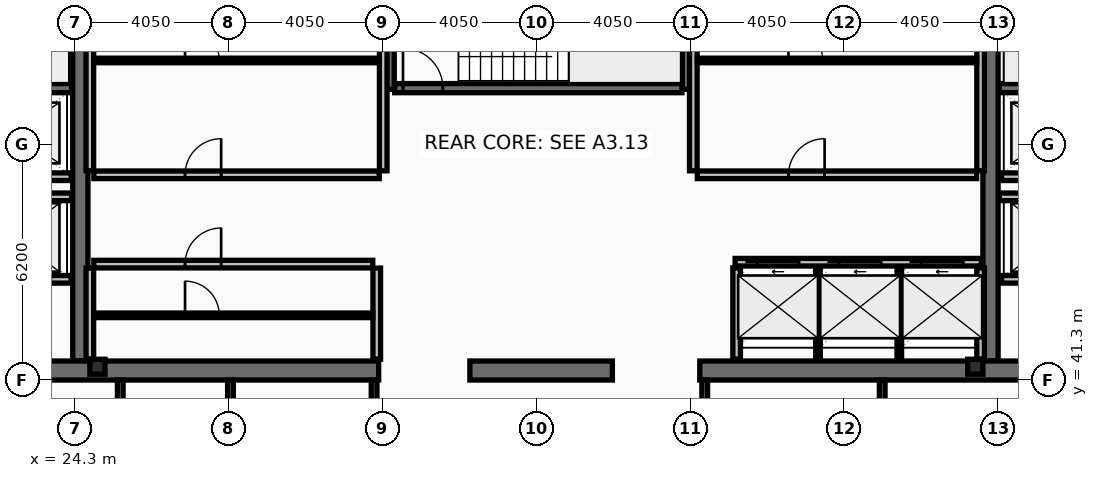
"""IFC4 building model, lengths in metres.
Left out: names, types, materials, properties, quantities, classifications, styles, units other than length and angle.
Written with IfcOpenShell. Run it as: python <this file> out.ifc"""

import sys

from ifc_helpers import new_model, si_unit, direction, frame, frame_2d, origin, origin_2d, place, context, subcontext, project, spatial, rectangle, i_section, extrude, element, fill, save


model = new_model("IFC4")
c1 = context("Model", 3, precision=1e-05, world=origin(), true_north=direction((0.0, 1.0)))
c2 = subcontext(c1, "Body", "Model", "MODEL_VIEW")
j1 = project(units=[si_unit("LENGTHUNIT", "METRE"), si_unit("PLANEANGLEUNIT", "RADIAN")], contexts=[c1])
p1 = place(None, origin())
s1 = spatial("IfcSite", under=j1, at=p1, CompositionType="ELEMENT")
p2 = place(p1, origin())
s2 = spatial("IfcBuilding", under=s1, at=p2, CompositionType="ELEMENT")
p3 = place(p2, frame((0.0, 0.0, 280.6)))
s3 = spatial("IfcBuildingStorey", under=s2, at=p3, CompositionType="ELEMENT", Elevation=280.6)
for number, where, z_axis, x_axis in (
    (1, (24.45, 41.8, 0.0), (0.0, 0.0, 1.0), (0.0, 1.0, 0.0)),
    (2, (48.4, 41.8, 0.0), (0.0, 0.0, 1.0), (0.0, 1.0, 0.0)),
):
    element("IfcWall", number, at=place(p3, frame(where, z_axis=z_axis, x_axis=x_axis)), inside=s3, PredefinedType="SHEAR", context=c2, shape_type="SweptSolid", body=[
        extrude(rectangle(XDim=11.4, YDim=0.4, at=frame_2d((5.7, 0.0))), origin(), (0.0, 0.0, 1.0), 3.44),
    ])
p4 = place(p3, frame((32.3, 41.55, 0.0), z_axis=(0.0, 0.0, 1.0), x_axis=(-1.0, 0.0, 0.0)))
e3 = element("IfcWall", 3, at=p4, inside=s3, PredefinedType="SHEAR", context=c2, shape_type="SweptSolid", body=[
    extrude(rectangle(XDim=11.45, YDim=0.5, at=frame_2d((5.725, 0.0))), origin(), (0.0, 0.0, 1.0), 3.44),
])
p5 = place(p3, frame((38.45, 41.55, 0.0), z_axis=(0.0, 0.0, 1.0), x_axis=(-1.0, 0.0, 0.0)))
e4 = element("IfcWall", 4, at=p5, inside=s3, PredefinedType="SHEAR", context=c2, shape_type="SweptSolid", body=[
    extrude(rectangle(XDim=3.75, YDim=0.5, at=frame_2d((1.875, 0.0))), origin(), (0.0, 0.0, 1.0), 3.44),
])
p6 = place(p3, frame((52.05, 41.55, 0.0), z_axis=(0.0, 0.0, 1.0), x_axis=(-1.0, 0.0, 0.0)))
e5 = element("IfcWall", 5, at=p6, inside=s3, PredefinedType="SHEAR", context=c2, shape_type="SweptSolid", body=[
    extrude(rectangle(XDim=11.3, YDim=0.5, at=frame_2d((5.65, 0.0))), origin(), (0.0, 0.0, 1.0), 3.44),
])
for number, where, z_axis, x_axis in (
    (6, (32.58, 48.95, 0.0), (0.0, 0.0, 1.0), (0.0, 1.0, 0.0)),
    (7, (40.42, 48.95, 0.0), (0.0, 0.0, 1.0), (0.0, 1.0, 0.0)),
):
    element("IfcWall", number, at=place(p3, frame(where, z_axis=z_axis, x_axis=x_axis)), inside=s3, PredefinedType="SHEAR", context=c2, shape_type="SweptSolid", body=[
        extrude(rectangle(XDim=4.25, YDim=0.26, at=frame_2d((2.125, 0.0))), origin(), (0.0, 0.0, 1.0), 3.44),
    ])
p7 = place(p3, frame((16.7, 48.98, 0.0), z_axis=(0.0, 0.0, 1.0), x_axis=(1.0, 0.0, 0.0)))
e8 = element("IfcWall", 8, at=p7, inside=s3, PredefinedType="SHEAR", context=c2, shape_type="SweptSolid", body=[
    extrude(rectangle(XDim=7.52, YDim=0.24, at=frame_2d((3.76, 0.0))), origin(), (0.0, 0.0, 1.0), 3.44),
])
p8 = place(p7, frame((0.22, 0.0, 0.0)))
e9 = element("IfcOpeningElement", 9, at=p8, cuts=e8, PredefinedType="OPENING", context=c2, shape_type="SweptSolid", body=[
    extrude(rectangle(XDim=1.05, YDim=2.15, at=frame_2d((0.525, 1.075))), frame((0.0, 0.13, 0.0), z_axis=(0.0, -1.0, 0.0), x_axis=(1.0, 0.0, 0.0)), (0.0, 0.0, 1.0), 0.26),
])
p9 = place(p3, frame((48.63, 48.98, 0.0), z_axis=(0.0, 0.0, 1.0), x_axis=(1.0, 0.0, 0.0)))
e10 = element("IfcWall", 10, at=p9, inside=s3, PredefinedType="SHEAR", context=c2, shape_type="SweptSolid", body=[
    extrude(rectangle(XDim=7.57, YDim=0.24, at=frame_2d((3.785, 0.0))), origin(), (0.0, 0.0, 1.0), 3.44),
])
p10 = place(p9, frame((6.3, 0.0, 0.0)))
e11 = element("IfcOpeningElement", 11, at=p10, cuts=e10, PredefinedType="OPENING", context=c2, shape_type="SweptSolid", body=[
    extrude(rectangle(XDim=1.05, YDim=2.15, at=frame_2d((0.525, 1.075))), frame((0.0, 0.13, 0.0), z_axis=(0.0, -1.0, 0.0), x_axis=(1.0, 0.0, 0.0)), (0.0, 0.0, 1.0), 0.26),
])
p11 = place(p3, frame((32.72, 48.98, 0.0), z_axis=(0.0, 0.0, 1.0), x_axis=(1.0, 0.0, 0.0)))
e12 = element("IfcWall", 12, at=p11, inside=s3, PredefinedType="SHEAR", context=c2, shape_type="SweptSolid", body=[
    extrude(rectangle(XDim=7.56, YDim=0.24, at=frame_2d((3.78, 0.0))), origin(), (0.0, 0.0, 1.0), 3.44),
])
p12 = place(p11, frame((0.22, 0.0, 0.0)))
e13 = element("IfcOpeningElement", 13, at=p12, cuts=e12, PredefinedType="OPENING", context=c2, shape_type="SweptSolid", body=[
    extrude(rectangle(XDim=1.05, YDim=2.15, at=frame_2d((0.525, 1.075))), frame((0.0, 0.13, 0.0), z_axis=(0.0, -1.0, 0.0), x_axis=(1.0, 0.0, 0.0)), (0.0, 0.0, 1.0), 0.26),
])
for number, where, z_axis, x_axis in (
    (14, (24.9, 41.65, 0.0), (0.0, 0.0, 1.0), (1.0, 0.0, 0.0)),
    (15, (48.0, 41.65, 0.0), (0.0, 0.0, 1.0), (1.0, 0.0, 0.0)),
):
    element("IfcColumn", number, at=place(p3, frame(where, z_axis=z_axis, x_axis=x_axis)), inside=s3, PredefinedType="COLUMN", context=c2, shape_type="SweptSolid", body=[
        extrude(i_section(OverallWidth=0.399, OverallDepth=0.393, WebThickness=0.023, FlangeThickness=0.037, at=origin_2d()), origin(), (0.0, 0.0, 1.0), 3.6),
    ])
p13 = place(p3, frame((41.68, 44.4, 0.0), z_axis=(0.0, 0.0, 1.0), x_axis=(1.0, 0.0, 0.0)))
e16 = element("IfcWall", 16, at=p13, inside=s3, PredefinedType="PARTITIONING", context=c2, shape_type="SweptSolid", body=[
    extrude(rectangle(XDim=6.48, YDim=0.2, at=frame_2d((3.24, 0.0))), origin(), (0.0, 0.0, 1.0), 3.44),
])
p14 = place(p13, frame((0.58, 0.0, 0.0)))
e17 = element("IfcOpeningElement", 17, at=p14, cuts=e16, PredefinedType="OPENING", context=c2, shape_type="SweptSolid", body=[
    extrude(rectangle(XDim=1.1, YDim=2.18, at=frame_2d((0.55, 1.09))), frame((0.0, 0.11, 0.0), z_axis=(0.0, -1.0, 0.0), x_axis=(1.0, 0.0, 0.0)), (0.0, 0.0, 1.0), 0.22),
])
p15 = place(p13, frame((2.74, 0.0, 0.0)))
e18 = element("IfcOpeningElement", 18, at=p15, cuts=e16, PredefinedType="OPENING", context=c2, shape_type="SweptSolid", body=[
    extrude(rectangle(XDim=1.1, YDim=2.18, at=frame_2d((0.55, 1.09))), frame((0.0, 0.11, 0.0), z_axis=(0.0, -1.0, 0.0), x_axis=(1.0, 0.0, 0.0)), (0.0, 0.0, 1.0), 0.22),
])
p16 = place(p13, frame((4.9, 0.0, 0.0)))
e19 = element("IfcOpeningElement", 19, at=p16, cuts=e16, PredefinedType="OPENING", context=c2, shape_type="SweptSolid", body=[
    extrude(rectangle(XDim=1.1, YDim=2.18, at=frame_2d((0.55, 1.09))), frame((0.0, 0.11, 0.0), z_axis=(0.0, -1.0, 0.0), x_axis=(1.0, 0.0, 0.0)), (0.0, 0.0, 1.0), 0.22),
])
p17 = place(p3, frame((51.61, 43.95, 0.0), z_axis=(0.0, 0.0, 1.0), x_axis=(-1.0, 0.0, 0.0)))
e20 = element("IfcWall", 20, at=p17, inside=s3, PredefinedType="PARTITIONING", context=c2, shape_type="SweptSolid", body=[
    extrude(rectangle(XDim=2.92, YDim=0.2, at=frame_2d((1.46, 0.0))), origin(), (0.0, 0.0, 1.0), 3.44),
])
p18 = place(p17, frame((0.81, 0.0, 0.0)))
e21 = element("IfcOpeningElement", 21, at=p18, cuts=e20, PredefinedType="OPENING", context=c2, shape_type="SweptSolid", body=[
    extrude(rectangle(XDim=1.3, YDim=2.18, at=frame_2d((0.65, 1.09))), frame((0.0, 0.11, 0.0), z_axis=(0.0, -1.0, 0.0), x_axis=(1.0, 0.0, 0.0)), (0.0, 0.0, 1.0), 0.22),
])
p19 = place(p3, frame((24.21, 43.95, 0.0), z_axis=(0.0, 0.0, 1.0), x_axis=(-1.0, 0.0, 0.0)))
e22 = element("IfcWall", 22, at=p19, inside=s3, PredefinedType="PARTITIONING", context=c2, shape_type="SweptSolid", body=[
    extrude(rectangle(XDim=2.97, YDim=0.2, at=frame_2d((1.485, 0.0))), origin(), (0.0, 0.0, 1.0), 3.44),
])
p20 = place(p19, frame((0.86, 0.0, 0.0)))
e23 = element("IfcOpeningElement", 23, at=p20, cuts=e22, PredefinedType="OPENING", context=c2, shape_type="SweptSolid", body=[
    extrude(rectangle(XDim=1.3, YDim=2.18, at=frame_2d((0.65, 1.09))), frame((0.0, 0.11, 0.0), z_axis=(0.0, -1.0, 0.0), x_axis=(1.0, 0.0, 0.0)), (0.0, 0.0, 1.0), 0.22),
])
p21 = place(p3, frame((51.61, 46.65, 0.0), z_axis=(0.0, 0.0, 1.0), x_axis=(-1.0, 0.0, 0.0)))
e24 = element("IfcWall", 24, at=p21, inside=s3, PredefinedType="PARTITIONING", context=c2, shape_type="SweptSolid", body=[
    extrude(rectangle(XDim=2.92, YDim=0.2, at=frame_2d((1.46, 0.0))), origin(), (0.0, 0.0, 1.0), 3.44),
])
p22 = place(p21, frame((0.86, 0.0, 0.0)))
e25 = element("IfcOpeningElement", 25, at=p22, cuts=e24, PredefinedType="OPENING", context=c2, shape_type="SweptSolid", body=[
    extrude(rectangle(XDim=1.2, YDim=2.18, at=frame_2d((0.6, 1.09))), frame((0.0, 0.11, 0.0), z_axis=(0.0, -1.0, 0.0), x_axis=(1.0, 0.0, 0.0)), (0.0, 0.0, 1.0), 0.22),
])
p23 = place(p3, frame((24.21, 46.65, 0.0), z_axis=(0.0, 0.0, 1.0), x_axis=(-1.0, 0.0, 0.0)))
e26 = element("IfcWall", 26, at=p23, inside=s3, PredefinedType="PARTITIONING", context=c2, shape_type="SweptSolid", body=[
    extrude(rectangle(XDim=2.97, YDim=0.2, at=frame_2d((1.485, 0.0))), origin(), (0.0, 0.0, 1.0), 3.44),
])
p24 = place(p23, frame((0.91, 0.0, 0.0)))
e27 = element("IfcOpeningElement", 27, at=p24, cuts=e26, PredefinedType="OPENING", context=c2, shape_type="SweptSolid", body=[
    extrude(rectangle(XDim=1.2, YDim=2.18, at=frame_2d((0.6, 1.09))), frame((0.0, 0.11, 0.0), z_axis=(0.0, -1.0, 0.0), x_axis=(1.0, 0.0, 0.0)), (0.0, 0.0, 1.0), 0.22),
])
p25 = place(p3, frame((21.2, 46.12, 0.0), z_axis=(0.0, 0.0, 1.0), x_axis=(1.0, 0.0, 0.0)))
e28 = element("IfcWall", 28, at=p25, inside=s3, PredefinedType="PARTITIONING", context=c2, shape_type="SweptSolid", body=[
    extrude(rectangle(XDim=3.02, YDim=0.2, at=frame_2d((1.51, 0.0))), origin(), (0.0, 0.0, 1.0), 3.44),
])
p26 = place(p3, frame((48.63, 46.12, 0.0), z_axis=(0.0, 0.0, 1.0), x_axis=(1.0, 0.0, 0.0)))
e29 = element("IfcWall", 29, at=p26, inside=s3, PredefinedType="PARTITIONING", context=c2, shape_type="SweptSolid", body=[
    extrude(rectangle(XDim=3.07, YDim=0.2, at=frame_2d((1.535, 0.0))), origin(), (0.0, 0.0, 1.0), 3.44),
])
for number, where, z_axis, x_axis in (
    (30, (24.7, 46.805, 0.0), (0.0, 0.0, 1.0), (0.0, 1.0, 0.0)),
    (31, (32.42, 46.805, 0.0), (0.0, 0.0, 1.0), (0.0, 1.0, 0.0)),
):
    element("IfcWall", number, at=place(p3, frame(where, z_axis=z_axis, x_axis=x_axis)), inside=s3, PredefinedType="PARTITIONING", context=c2, shape_type="SweptSolid", body=[
        extrude(rectangle(XDim=5.99, YDim=0.2, at=frame_2d((2.995, 0.0))), origin(), (0.0, 0.0, 1.0), 3.44),
    ])
p27 = place(p3, frame((24.805, 49.709, 0.0), z_axis=(0.0, 0.0, 1.0), x_axis=(1.0, 0.0, 0.0)))
e32 = element("IfcWall", 32, at=p27, inside=s3, PredefinedType="PARTITIONING", context=c2, shape_type="SweptSolid", body=[
    extrude(rectangle(XDim=7.51, YDim=0.12, at=frame_2d((3.755, 0.0))), origin(), (0.0, 0.0, 1.0), 3.44),
])
p28 = place(p27, frame((2.4, 0.0, 0.0)))
e33 = element("IfcOpeningElement", 33, at=p28, cuts=e32, PredefinedType="OPENING", context=c2, shape_type="SweptSolid", body=[
    extrude(rectangle(XDim=0.9, YDim=2.05, at=frame_2d((0.45, 1.025))), frame((0.0, 0.07, 0.0), z_axis=(0.0, -1.0, 0.0), x_axis=(1.0, 0.0, 0.0)), (0.0, 0.0, 1.0), 0.14),
])
p29 = place(p3, frame((24.805, 46.7, 0.0), z_axis=(0.0, 0.0, 1.0), x_axis=(1.0, 0.0, 0.0)))
e34 = element("IfcWall", 34, at=p29, inside=s3, PredefinedType="PARTITIONING", context=c2, shape_type="SweptSolid", body=[
    extrude(rectangle(XDim=7.51, YDim=0.2, at=frame_2d((3.755, 0.0))), origin(), (0.0, 0.0, 1.0), 3.44),
])
p30 = place(p29, frame((2.4, 0.0, 0.0)))
e35 = element("IfcOpeningElement", 35, at=p30, cuts=e34, PredefinedType="OPENING", context=c2, shape_type="SweptSolid", body=[
    extrude(rectangle(XDim=0.95, YDim=2.1, at=frame_2d((0.475, 1.05))), frame((0.0, 0.11, 0.0), z_axis=(0.0, -1.0, 0.0), x_axis=(1.0, 0.0, 0.0)), (0.0, 0.0, 1.0), 0.22),
])
for number, where, z_axis, x_axis in (
    (36, (24.7, 41.85, 0.0), (0.0, 0.0, 1.0), (0.0, 1.0, 0.0)),
    (37, (32.25, 41.85, 0.0), (0.0, 0.0, 1.0), (0.0, 1.0, 0.0)),
):
    element("IfcWall", number, at=place(p3, frame(where, z_axis=z_axis, x_axis=x_axis)), inside=s3, PredefinedType="PARTITIONING", context=c2, shape_type="SweptSolid", body=[
        extrude(rectangle(XDim=2.395, YDim=0.2, at=frame_2d((1.198, 0.0))), origin(), (0.0, 0.0, 1.0), 3.44),
    ])
p31 = place(p3, frame((24.805, 43.002, 0.0), z_axis=(0.0, 0.0, 1.0), x_axis=(1.0, 0.0, 0.0)))
e38 = element("IfcWall", 38, at=p31, inside=s3, PredefinedType="PARTITIONING", context=c2, shape_type="SweptSolid", body=[
    extrude(rectangle(XDim=7.34, YDim=0.12, at=frame_2d((3.67, 0.0))), origin(), (0.0, 0.0, 1.0), 3.44),
])
p32 = place(p31, frame((2.4, 0.0, 0.0)))
e39 = element("IfcOpeningElement", 39, at=p32, cuts=e38, PredefinedType="OPENING", context=c2, shape_type="SweptSolid", body=[
    extrude(rectangle(XDim=0.9, YDim=2.05, at=frame_2d((0.45, 1.025))), frame((0.0, 0.07, 0.0), z_axis=(0.0, -1.0, 0.0), x_axis=(1.0, 0.0, 0.0)), (0.0, 0.0, 1.0), 0.14),
])
p33 = place(p3, frame((24.805, 44.35, 0.0), z_axis=(0.0, 0.0, 1.0), x_axis=(1.0, 0.0, 0.0)))
e40 = element("IfcWall", 40, at=p33, inside=s3, PredefinedType="PARTITIONING", context=c2, shape_type="SweptSolid", body=[
    extrude(rectangle(XDim=7.34, YDim=0.2, at=frame_2d((3.67, 0.0))), origin(), (0.0, 0.0, 1.0), 3.44),
])
p34 = place(p33, frame((2.4, 0.0, 0.0)))
e41 = element("IfcOpeningElement", 41, at=p34, cuts=e40, PredefinedType="OPENING", context=c2, shape_type="SweptSolid", body=[
    extrude(rectangle(XDim=0.95, YDim=2.1, at=frame_2d((0.475, 1.05))), frame((0.0, 0.11, 0.0), z_axis=(0.0, -1.0, 0.0), x_axis=(1.0, 0.0, 0.0)), (0.0, 0.0, 1.0), 0.22),
])
for number, where, z_axis, x_axis in (
    (42, (40.58, 46.805, 0.0), (0.0, 0.0, 1.0), (0.0, 1.0, 0.0)),
    (43, (48.14, 46.805, 0.0), (0.0, 0.0, 1.0), (0.0, 1.0, 0.0)),
):
    element("IfcWall", number, at=place(p3, frame(where, z_axis=z_axis, x_axis=x_axis)), inside=s3, PredefinedType="PARTITIONING", context=c2, shape_type="SweptSolid", body=[
        extrude(rectangle(XDim=5.99, YDim=0.2, at=frame_2d((2.995, 0.0))), origin(), (0.0, 0.0, 1.0), 3.44),
    ])
p35 = place(p3, frame((40.685, 49.709, 0.0), z_axis=(0.0, 0.0, 1.0), x_axis=(1.0, 0.0, 0.0)))
e44 = element("IfcWall", 44, at=p35, inside=s3, PredefinedType="PARTITIONING", context=c2, shape_type="SweptSolid", body=[
    extrude(rectangle(XDim=7.35, YDim=0.12, at=frame_2d((3.675, 0.0))), origin(), (0.0, 0.0, 1.0), 3.44),
])
p36 = place(p35, frame((2.4, 0.0, 0.0)))
e45 = element("IfcOpeningElement", 45, at=p36, cuts=e44, PredefinedType="OPENING", context=c2, shape_type="SweptSolid", body=[
    extrude(rectangle(XDim=0.9, YDim=2.05, at=frame_2d((0.45, 1.025))), frame((0.0, 0.07, 0.0), z_axis=(0.0, -1.0, 0.0), x_axis=(1.0, 0.0, 0.0)), (0.0, 0.0, 1.0), 0.14),
])
p37 = place(p3, frame((40.685, 46.7, 0.0), z_axis=(0.0, 0.0, 1.0), x_axis=(1.0, 0.0, 0.0)))
e46 = element("IfcWall", 46, at=p37, inside=s3, PredefinedType="PARTITIONING", context=c2, shape_type="SweptSolid", body=[
    extrude(rectangle(XDim=7.35, YDim=0.2, at=frame_2d((3.675, 0.0))), origin(), (0.0, 0.0, 1.0), 3.44),
])
p38 = place(p37, frame((2.4, 0.0, 0.0)))
e47 = element("IfcOpeningElement", 47, at=p38, cuts=e46, PredefinedType="OPENING", context=c2, shape_type="SweptSolid", body=[
    extrude(rectangle(XDim=0.95, YDim=2.1, at=frame_2d((0.475, 1.05))), frame((0.0, 0.11, 0.0), z_axis=(0.0, -1.0, 0.0), x_axis=(1.0, 0.0, 0.0)), (0.0, 0.0, 1.0), 0.22),
])
for number, where, z_axis, x_axis in (
    (48, (41.72, 41.85, 0.0), (0.0, 0.0, 1.0), (0.0, 1.0, 0.0)),
    (49, (48.14, 41.85, 0.0), (0.0, 0.0, 1.0), (0.0, 1.0, 0.0)),
):
    element("IfcWall", number, at=place(p3, frame(where, z_axis=z_axis, x_axis=x_axis)), inside=s3, PredefinedType="PARTITIONING", context=c2, shape_type="SweptSolid", body=[
        extrude(rectangle(XDim=2.4, YDim=0.2, at=frame_2d((1.2, 0.0))), origin(), (0.0, 0.0, 1.0), 3.44),
    ])
for number, where, z_axis, x_axis in (
    (50, (43.86, 41.85, 0.0), (0.0, 0.0, 1.0), (0.0, 1.0, 0.0)),
    (51, (46.0, 41.85, 0.0), (0.0, 0.0, 1.0), (0.0, 1.0, 0.0)),
):
    element("IfcWall", number, at=place(p3, frame(where, z_axis=z_axis, x_axis=x_axis)), inside=s3, PredefinedType="PARTITIONING", context=c2, shape_type="SweptSolid", body=[
        extrude(rectangle(XDim=2.4, YDim=0.12, at=frame_2d((1.2, 0.0))), origin(), (0.0, 0.0, 1.0), 3.44),
    ])
for number, where, z_axis, x_axis in (
    (52, (25.5, 38.28, 0.0), (0.0, 0.0, 1.0), (0.0, 1.0, 0.0)),
    (53, (28.4, 38.28, 0.0), (0.0, 0.0, 1.0), (0.0, 1.0, 0.0)),
    (54, (32.18, 38.28, 0.0), (0.0, 0.0, 1.0), (0.0, 1.0, 0.0)),
    (55, (40.88, 38.28, 0.0), (0.0, 0.0, 1.0), (0.0, 1.0, 0.0)),
    (56, (45.55, 38.28, 0.0), (0.0, 0.0, 1.0), (0.0, 1.0, 0.0)),
):
    element("IfcWall", number, at=place(p3, frame(where, z_axis=z_axis, x_axis=x_axis)), inside=s3, PredefinedType="PARTITIONING", context=c2, shape_type="SweptSolid", body=[
        extrude(rectangle(XDim=3.02, YDim=0.15, at=frame_2d((1.51, 0.0))), origin(), (0.0, 0.0, 1.0), 3.44),
    ])
p39 = place(p12, origin())
e57 = element("IfcDoor", 57, at=p39, inside=s3, OperationType="SINGLE_SWING_LEFT", PredefinedType="DOOR", context=c2, shape_type="SweptSolid", body=[
    extrude(rectangle(XDim=1.05, YDim=2.15, at=frame_2d((0.525, 1.075))), frame((0.0, 0.025, 0.0), z_axis=(0.0, -1.0, 0.0), x_axis=(1.0, 0.0, 0.0)), (0.0, 0.0, 1.0), 0.05),
])
fill(e13, e57)
p40 = place(p14, origin())
e58 = element("IfcDoor", 58, at=p40, inside=s3, OperationType="SLIDING_TO_LEFT", PredefinedType="DOOR", context=c2, shape_type="SweptSolid", body=[
    extrude(rectangle(XDim=1.1, YDim=2.18, at=frame_2d((0.55, 1.09))), frame((0.0, 0.025, 0.0), z_axis=(0.0, -1.0, 0.0), x_axis=(1.0, 0.0, 0.0)), (0.0, 0.0, 1.0), 0.05),
])
fill(e17, e58)
p41 = place(p15, origin())
e59 = element("IfcDoor", 59, at=p41, inside=s3, OperationType="SLIDING_TO_LEFT", PredefinedType="DOOR", context=c2, shape_type="SweptSolid", body=[
    extrude(rectangle(XDim=1.1, YDim=2.18, at=frame_2d((0.55, 1.09))), frame((0.0, 0.025, 0.0), z_axis=(0.0, -1.0, 0.0), x_axis=(1.0, 0.0, 0.0)), (0.0, 0.0, 1.0), 0.05),
])
fill(e18, e59)
p42 = place(p16, origin())
e60 = element("IfcDoor", 60, at=p42, inside=s3, OperationType="SLIDING_TO_LEFT", PredefinedType="DOOR", context=c2, shape_type="SweptSolid", body=[
    extrude(rectangle(XDim=1.1, YDim=2.18, at=frame_2d((0.55, 1.09))), frame((0.0, 0.025, 0.0), z_axis=(0.0, -1.0, 0.0), x_axis=(1.0, 0.0, 0.0)), (0.0, 0.0, 1.0), 0.05),
])
fill(e19, e60)
p43 = place(p28, origin())
e61 = element("IfcDoor", 61, at=p43, inside=s3, OperationType="SINGLE_SWING_LEFT", PredefinedType="DOOR", context=c2, shape_type="SweptSolid", body=[
    extrude(rectangle(XDim=0.9, YDim=2.05, at=frame_2d((0.45, 1.025))), frame((0.0, 0.025, 0.0), z_axis=(0.0, -1.0, 0.0), x_axis=(1.0, 0.0, 0.0)), (0.0, 0.0, 1.0), 0.05),
])
fill(e33, e61)
p44 = place(p30, origin())
e62 = element("IfcDoor", 62, at=p44, inside=s3, OperationType="SINGLE_SWING_RIGHT", PredefinedType="DOOR", context=c2, shape_type="SweptSolid", body=[
    extrude(rectangle(XDim=0.95, YDim=2.1, at=frame_2d((0.475, 1.05))), frame((0.0, 0.025, 0.0), z_axis=(0.0, -1.0, 0.0), x_axis=(1.0, 0.0, 0.0)), (0.0, 0.0, 1.0), 0.05),
])
fill(e35, e62)
p45 = place(p32, origin())
e63 = element("IfcDoor", 63, at=p45, inside=s3, OperationType="SINGLE_SWING_LEFT", PredefinedType="DOOR", context=c2, shape_type="SweptSolid", body=[
    extrude(rectangle(XDim=0.9, YDim=2.05, at=frame_2d((0.45, 1.025))), frame((0.0, 0.025, 0.0), z_axis=(0.0, -1.0, 0.0), x_axis=(1.0, 0.0, 0.0)), (0.0, 0.0, 1.0), 0.05),
])
fill(e39, e63)
p46 = place(p34, origin())
e64 = element("IfcDoor", 64, at=p46, inside=s3, OperationType="SINGLE_SWING_RIGHT", PredefinedType="DOOR", context=c2, shape_type="SweptSolid", body=[
    extrude(rectangle(XDim=0.95, YDim=2.1, at=frame_2d((0.475, 1.05))), frame((0.0, 0.025, 0.0), z_axis=(0.0, -1.0, 0.0), x_axis=(1.0, 0.0, 0.0)), (0.0, 0.0, 1.0), 0.05),
])
fill(e41, e64)
p47 = place(p36, origin())
e65 = element("IfcDoor", 65, at=p47, inside=s3, OperationType="SINGLE_SWING_LEFT", PredefinedType="DOOR", context=c2, shape_type="SweptSolid", body=[
    extrude(rectangle(XDim=0.9, YDim=2.05, at=frame_2d((0.45, 1.025))), frame((0.0, 0.025, 0.0), z_axis=(0.0, -1.0, 0.0), x_axis=(1.0, 0.0, 0.0)), (0.0, 0.0, 1.0), 0.05),
])
fill(e45, e65)
p48 = place(p38, origin())
e66 = element("IfcDoor", 66, at=p48, inside=s3, OperationType="SINGLE_SWING_RIGHT", PredefinedType="DOOR", context=c2, shape_type="SweptSolid", body=[
    extrude(rectangle(XDim=0.95, YDim=2.1, at=frame_2d((0.475, 1.05))), frame((0.0, 0.025, 0.0), z_axis=(0.0, -1.0, 0.0), x_axis=(1.0, 0.0, 0.0)), (0.0, 0.0, 1.0), 0.05),
])
fill(e47, e66)
save(model, sys.argv[1])
